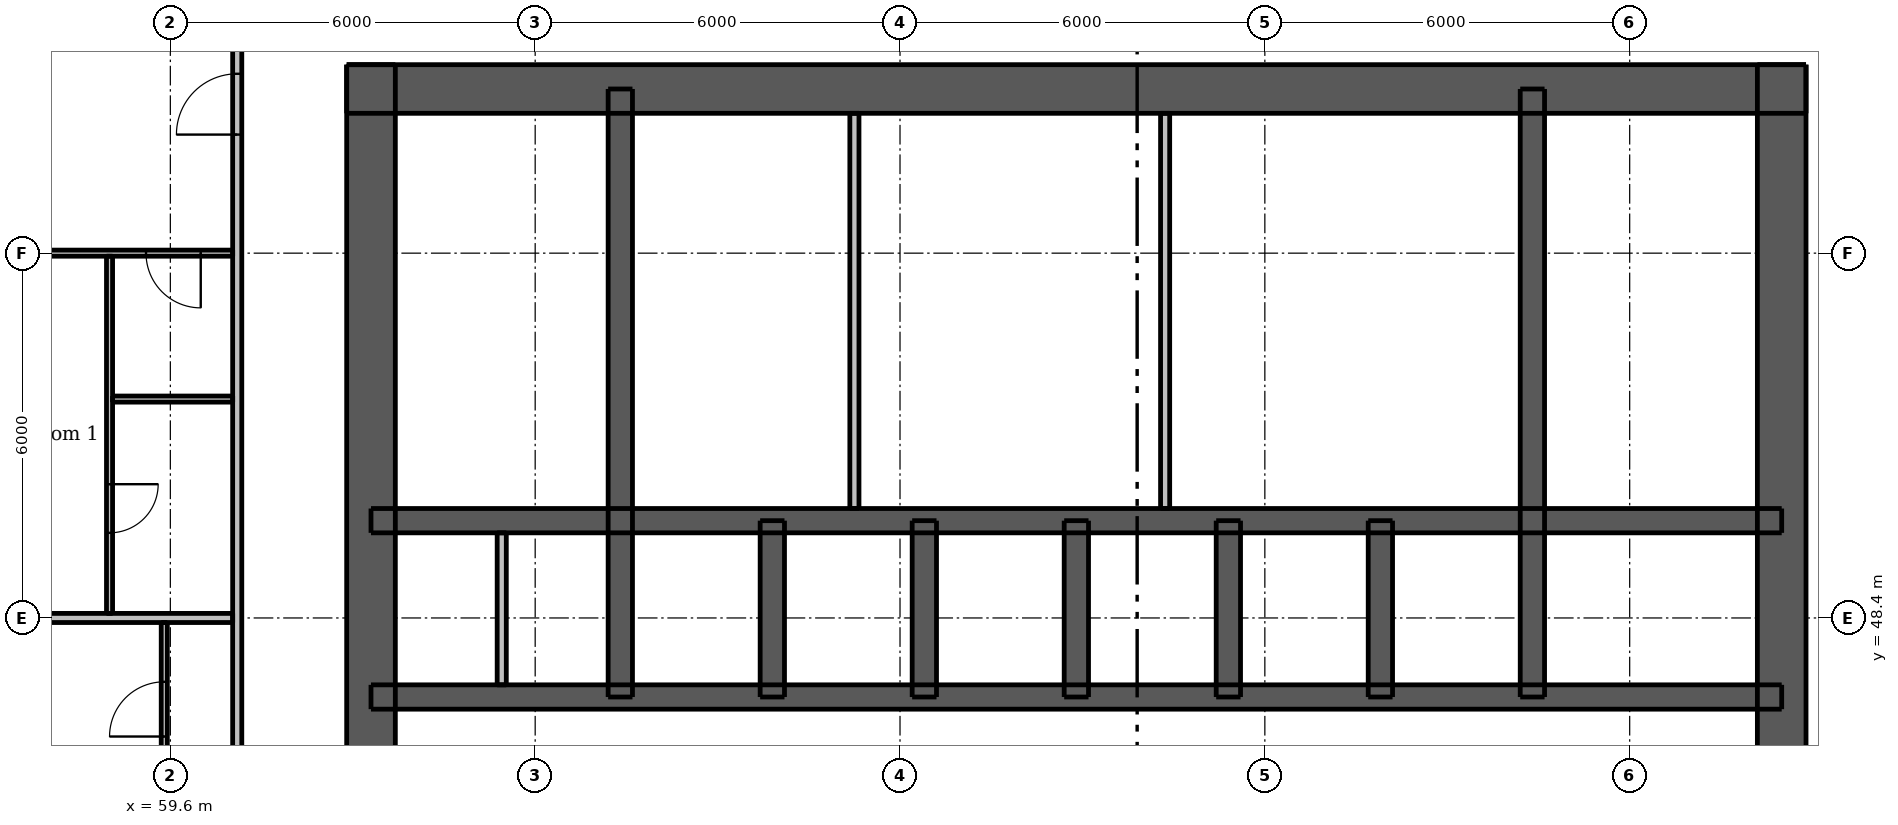
"""IFC4 building model, lengths in metres.
Left out: names, types, materials, properties, quantities, classifications, styles, units other than length and angle.
Written with IfcOpenShell. Run it as: python <this file> out.ifc"""

import sys

from ifc_helpers import new_model, si_unit, direction, frame, frame_2d, origin, place, context, subcontext, project, spatial, rectangle, extrude, element, fill, save


model = new_model("IFC4")
c1 = context("Model", 3, precision=1e-05, world=origin(), true_north=direction((0.0, 1.0)))
c2 = subcontext(c1, "Body", "Model", "MODEL_VIEW")
j1 = project(units=[si_unit("LENGTHUNIT", "METRE"), si_unit("PLANEANGLEUNIT", "RADIAN")], contexts=[c1])
p1 = place(None, origin())
s1 = spatial("IfcSite", under=j1, at=p1, CompositionType="ELEMENT")
p2 = place(p1, origin())
s2 = spatial("IfcBuilding", under=s1, at=p2, CompositionType="ELEMENT")
p3 = place(p2, frame((0.0, 0.0, 115.0)))
s3 = spatial("IfcBuildingStorey", under=s2, at=p3, CompositionType="ELEMENT", Elevation=115.0)
p4 = place(p3, frame((62.5, 57.1, 0.0), z_axis=(0.0, 0.0, 1.0), x_axis=(1.0, 0.0, 0.0)))
e1 = element("IfcWall", 1, at=p4, inside=s3, PredefinedType="SHEAR", context=c2, shape_type="SweptSolid", body=[
    extrude(rectangle(XDim=24.0, YDim=0.8, at=frame_2d((12.0, 0.0))), origin(), (0.0, 0.0, 1.0), 3.05),
])
p5 = place(p4, frame((20.9, 0.0, 0.0)))
e2 = element("IfcOpeningElement", 2, at=p5, cuts=e1, PredefinedType="OPENING", context=c2, shape_type="SweptSolid", body=[
    extrude(rectangle(XDim=1.1, YDim=2.1, at=frame_2d((0.55, 1.05))), frame((0.0, 0.41, 0.0), z_axis=(0.0, -1.0, 0.0), x_axis=(1.0, 0.0, 0.0)), (0.0, 0.0, 1.0), 0.82),
])
p6 = place(p4, frame((2.0, 0.0, 0.0)))
e3 = element("IfcOpeningElement", 3, at=p6, cuts=e1, PredefinedType="OPENING", context=c2, shape_type="SweptSolid", body=[
    extrude(rectangle(XDim=1.1, YDim=2.1, at=frame_2d((0.55, 1.05))), frame((0.0, 0.41, 0.0), z_axis=(0.0, -1.0, 0.0), x_axis=(1.0, 0.0, 0.0)), (0.0, 0.0, 1.0), 0.82),
])
p7 = place(p4, frame((6.075, 0.0, 0.0)))
e4 = element("IfcOpeningElement", 4, at=p7, cuts=e1, PredefinedType="OPENING", context=c2, shape_type="SweptSolid", body=[
    extrude(rectangle(XDim=0.9, YDim=2.1, at=frame_2d((0.45, 1.05))), frame((0.0, 0.41, 0.0), z_axis=(0.0, -1.0, 0.0), x_axis=(1.0, 0.0, 0.0)), (0.0, 0.0, 1.0), 0.82),
])
p8 = place(p4, frame((10.455, 0.0, 0.0)))
e5 = element("IfcOpeningElement", 5, at=p8, cuts=e1, PredefinedType="OPENING", context=c2, shape_type="SweptSolid", body=[
    extrude(rectangle(XDim=0.9, YDim=2.1, at=frame_2d((0.45, 1.05))), frame((0.0, 0.41, 0.0), z_axis=(0.0, -1.0, 0.0), x_axis=(1.0, 0.0, 0.0)), (0.0, 0.0, 1.0), 0.82),
])
p9 = place(p4, frame((15.93, 0.0, 0.0)))
e6 = element("IfcOpeningElement", 6, at=p9, cuts=e1, PredefinedType="OPENING", context=c2, shape_type="SweptSolid", body=[
    extrude(rectangle(XDim=0.9, YDim=2.1, at=frame_2d((0.45, 1.05))), frame((0.0, 0.41, 0.0), z_axis=(0.0, -1.0, 0.0), x_axis=(1.0, 0.0, 0.0)), (0.0, 0.0, 1.0), 0.82),
])
p10 = place(p3, frame((62.9, 33.5, 0.0), z_axis=(0.0, 0.0, 1.0), x_axis=(0.0, 1.0, 0.0)))
e7 = element("IfcWall", 7, at=p10, inside=s3, PredefinedType="SHEAR", context=c2, shape_type="SweptSolid", body=[
    extrude(rectangle(XDim=24.0, YDim=0.8, at=frame_2d((12.0, 0.0))), origin(), (0.0, 0.0, 1.0), 3.05),
])
p11 = place(p10, frame((11.2, 0.0, 0.0)))
e8 = element("IfcOpeningElement", 8, at=p11, cuts=e7, PredefinedType="OPENING", context=c2, shape_type="SweptSolid", body=[
    extrude(rectangle(XDim=1.6, YDim=2.1, at=frame_2d((0.8, 1.05))), frame((0.0, 0.41, 0.0), z_axis=(0.0, -1.0, 0.0), x_axis=(1.0, 0.0, 0.0)), (0.0, 0.0, 1.0), 0.82),
])
p12 = place(p3, frame((86.1, 33.5, 0.0), z_axis=(0.0, 0.0, 1.0), x_axis=(0.0, 1.0, 0.0)))
e9 = element("IfcWall", 9, at=p12, inside=s3, PredefinedType="SHEAR", context=c2, shape_type="SweptSolid", body=[
    extrude(rectangle(XDim=24.0, YDim=0.8, at=frame_2d((12.0, 0.0))), origin(), (0.0, 0.0, 1.0), 3.05),
])
p13 = place(p12, frame((11.2, 0.0, 0.0)))
e10 = element("IfcOpeningElement", 10, at=p13, cuts=e9, PredefinedType="OPENING", context=c2, shape_type="SweptSolid", body=[
    extrude(rectangle(XDim=1.6, YDim=2.1, at=frame_2d((0.8, 1.05))), frame((0.0, 0.41, 0.0), z_axis=(0.0, -1.0, 0.0), x_axis=(1.0, 0.0, 0.0)), (0.0, 0.0, 1.0), 0.82),
])
p14 = place(p3, frame((62.9, 47.1, 0.0), z_axis=(0.0, 0.0, 1.0), x_axis=(1.0, 0.0, 0.0)))
e11 = element("IfcWall", 11, at=p14, inside=s3, PredefinedType="SHEAR", context=c2, shape_type="SweptSolid", body=[
    extrude(rectangle(XDim=23.2, YDim=0.4, at=frame_2d((11.6, 0.0))), origin(), (0.0, 0.0, 1.0), 3.05),
])
p15 = place(p14, frame((0.825, 0.0, 0.0)))
e12 = element("IfcOpeningElement", 12, at=p15, cuts=e11, PredefinedType="OPENING", context=c2, shape_type="SweptSolid", body=[
    extrude(rectangle(XDim=0.9, YDim=2.1, at=frame_2d((0.45, 1.05))), frame((0.0, 0.21, 0.0), z_axis=(0.0, -1.0, 0.0), x_axis=(1.0, 0.0, 0.0)), (0.0, 0.0, 1.0), 0.42),
])
p16 = place(p14, frame((2.575, 0.0, 0.0)))
e13 = element("IfcOpeningElement", 13, at=p16, cuts=e11, PredefinedType="OPENING", context=c2, shape_type="SweptSolid", body=[
    extrude(rectangle(XDim=0.9, YDim=2.1, at=frame_2d((0.45, 1.05))), frame((0.0, 0.21, 0.0), z_axis=(0.0, -1.0, 0.0), x_axis=(1.0, 0.0, 0.0)), (0.0, 0.0, 1.0), 0.42),
])
p17 = place(p14, frame((20.6, 0.0, 0.0)))
e14 = element("IfcOpeningElement", 14, at=p17, cuts=e11, PredefinedType="OPENING", context=c2, shape_type="SweptSolid", body=[
    extrude(rectangle(XDim=0.9, YDim=2.1, at=frame_2d((0.45, 1.05))), frame((0.0, 0.21, 0.0), z_axis=(0.0, -1.0, 0.0), x_axis=(1.0, 0.0, 0.0)), (0.0, 0.0, 1.0), 0.42),
])
p18 = place(p3, frame((62.9, 50.0, 0.0), z_axis=(0.0, 0.0, 1.0), x_axis=(1.0, 0.0, 0.0)))
e15 = element("IfcWall", 15, at=p18, inside=s3, PredefinedType="SHEAR", context=c2, shape_type="SweptSolid", body=[
    extrude(rectangle(XDim=23.2, YDim=0.4, at=frame_2d((11.6, 0.0))), origin(), (0.0, 0.0, 1.0), 3.05),
])
for number, where, z_axis, x_axis in (
    (16, (67.0, 47.1, 0.0), (0.0, 0.0, 1.0), (0.0, 1.0, 0.0)),
    (17, (82.0, 47.1, 0.0), (0.0, 0.0, 1.0), (0.0, 1.0, 0.0)),
):
    element("IfcWall", number, at=place(p3, frame(where, z_axis=z_axis, x_axis=x_axis)), inside=s3, PredefinedType="SHEAR", context=c2, shape_type="SweptSolid", body=[
        extrude(rectangle(XDim=10.0, YDim=0.4, at=frame_2d((5.0, 0.0))), origin(), (0.0, 0.0, 1.0), 3.05),
    ])
for number, where, z_axis, x_axis in (
    (18, (69.5, 47.1, 0.0), (0.0, 0.0, 1.0), (0.0, 1.0, 0.0)),
    (19, (72.0, 47.1, 0.0), (0.0, 0.0, 1.0), (0.0, 1.0, 0.0)),
    (20, (74.5, 47.1, 0.0), (0.0, 0.0, 1.0), (0.0, 1.0, 0.0)),
    (21, (77.0, 47.1, 0.0), (0.0, 0.0, 1.0), (0.0, 1.0, 0.0)),
    (22, (79.5, 47.1, 0.0), (0.0, 0.0, 1.0), (0.0, 1.0, 0.0)),
):
    element("IfcWall", number, at=place(p3, frame(where, z_axis=z_axis, x_axis=x_axis)), inside=s3, PredefinedType="SHEAR", context=c2, shape_type="SweptSolid", body=[
        extrude(rectangle(XDim=2.9, YDim=0.4, at=frame_2d((1.45, 0.0))), origin(), (0.0, 0.0, 1.0), 3.05),
    ])
p19 = place(p3, frame((65.05, 47.3, 0.0), z_axis=(0.0, 0.0, 1.0), x_axis=(0.0, 1.0, 0.0)))
e23 = element("IfcWall", 23, at=p19, inside=s3, PredefinedType="PLUMBINGWALL", context=c2, shape_type="SweptSolid", body=[
    extrude(rectangle(XDim=2.5, YDim=0.15, at=frame_2d((1.25, 0.0))), origin(), (0.0, 0.0, 1.0), 3.05),
])
for number, where, z_axis, x_axis in (
    (24, (70.85, 50.2, 0.0), (0.0, 0.0, 1.0), (0.0, 1.0, 0.0)),
    (25, (75.96, 50.2, 0.0), (0.0, 0.0, 1.0), (0.0, 1.0, 0.0)),
):
    element("IfcWall", number, at=place(p3, frame(where, z_axis=z_axis, x_axis=x_axis)), inside=s3, PredefinedType="PLUMBINGWALL", context=c2, shape_type="SweptSolid", body=[
        extrude(rectangle(XDim=6.5, YDim=0.15, at=frame_2d((3.25, 0.0))), origin(), (0.0, 0.0, 1.0), 3.05),
    ])
p20 = place(p3, frame((58.6, 54.35, 0.0), z_axis=(0.0, 0.0, 1.0), x_axis=(0.0, -1.0, 0.0)))
e26 = element("IfcWall", 26, at=p20, inside=s3, PredefinedType="PARTITIONING", context=c2, shape_type="SweptSolid", body=[
    extrude(rectangle(XDim=5.875, YDim=0.1, at=frame_2d((2.938, 0.0))), origin(), (0.0, 0.0, 1.0), 3.05),
])
p21 = place(p20, frame((3.75, 0.0, 0.0)))
e27 = element("IfcOpeningElement", 27, at=p21, cuts=e26, PredefinedType="OPENING", context=c2, shape_type="SweptSolid", body=[
    extrude(rectangle(XDim=0.8, YDim=2.1, at=frame_2d((0.4, 1.05))), frame((0.0, 0.06, 0.0), z_axis=(0.0, -1.0, 0.0), x_axis=(1.0, 0.0, 0.0)), (0.0, 0.0, 1.0), 0.12),
])
p22 = place(p3, frame((59.5, 31.65, 0.0), z_axis=(0.0, 0.0, 1.0), x_axis=(0.0, 1.0, 0.0)))
e28 = element("IfcWall", 28, at=p22, inside=s3, PredefinedType="PARTITIONING", context=c2, shape_type="SweptSolid", body=[
    extrude(rectangle(XDim=16.675, YDim=0.1, at=frame_2d((8.337, 0.0))), origin(), (0.0, 0.0, 1.0), 2.51),
])
p23 = place(p22, frame((9.7, 0.0, 0.0)))
e29 = element("IfcOpeningElement", 29, at=p23, cuts=e28, PredefinedType="OPENING", context=c2, shape_type="SweptSolid", body=[
    extrude(rectangle(XDim=0.9, YDim=2.1, at=frame_2d((0.45, 1.05))), frame((0.0, 0.06, 0.0), z_axis=(0.0, -1.0, 0.0), x_axis=(1.0, 0.0, 0.0)), (0.0, 0.0, 1.0), 0.12),
])
p24 = place(p22, frame((14.8, 0.0, 0.0)))
e30 = element("IfcOpeningElement", 30, at=p24, cuts=e28, PredefinedType="OPENING", context=c2, shape_type="SweptSolid", body=[
    extrude(rectangle(XDim=0.9, YDim=2.1, at=frame_2d((0.45, 1.05))), frame((0.0, 0.06, 0.0), z_axis=(0.0, -1.0, 0.0), x_axis=(1.0, 0.0, 0.0)), (0.0, 0.0, 1.0), 0.12),
])
p25 = place(p22, frame((12.4, 0.0, 0.0)))
e31 = element("IfcOpeningElement", 31, at=p25, cuts=e28, PredefinedType="OPENING", context=c2, shape_type="SweptSolid", body=[
    extrude(rectangle(XDim=0.9, YDim=2.1, at=frame_2d((0.45, 1.05))), frame((0.0, 0.06, 0.0), z_axis=(0.0, -1.0, 0.0), x_axis=(1.0, 0.0, 0.0)), (0.0, 0.0, 1.0), 0.12),
])
p26 = place(p22, frame((5.2, 0.0, 0.0)))
e32 = element("IfcOpeningElement", 32, at=p26, cuts=e28, PredefinedType="OPENING", context=c2, shape_type="SweptSolid", body=[
    extrude(rectangle(XDim=0.9, YDim=2.1, at=frame_2d((0.45, 1.05))), frame((0.0, 0.06, 0.0), z_axis=(0.0, -1.0, 0.0), x_axis=(1.0, 0.0, 0.0)), (0.0, 0.0, 1.0), 0.12),
])
p27 = place(p22, frame((7.05, 0.0, 0.0)))
e33 = element("IfcOpeningElement", 33, at=p27, cuts=e28, PredefinedType="OPENING", context=c2, shape_type="SweptSolid", body=[
    extrude(rectangle(XDim=0.8, YDim=2.1, at=frame_2d((0.4, 1.05))), frame((0.0, 0.06, 0.0), z_axis=(0.0, -1.0, 0.0), x_axis=(1.0, 0.0, 0.0)), (0.0, 0.0, 1.0), 0.12),
])
p28 = place(p22, frame((0.75, 0.0, 0.0)))
e34 = element("IfcOpeningElement", 34, at=p28, cuts=e28, PredefinedType="OPENING", context=c2, shape_type="SweptSolid", body=[
    extrude(rectangle(XDim=0.9, YDim=2.1, at=frame_2d((0.45, 1.05))), frame((0.0, 0.06, 0.0), z_axis=(0.0, -1.0, 0.0), x_axis=(1.0, 0.0, 0.0)), (0.0, 0.0, 1.0), 0.12),
])
p29 = place(p22, frame((3.15, 0.0, 0.0)))
e35 = element("IfcOpeningElement", 35, at=p29, cuts=e28, PredefinedType="OPENING", context=c2, shape_type="SweptSolid", body=[
    extrude(rectangle(XDim=0.8, YDim=2.1, at=frame_2d((0.4, 1.05))), frame((0.0, 0.06, 0.0), z_axis=(0.0, -1.0, 0.0), x_axis=(1.0, 0.0, 0.0)), (0.0, 0.0, 1.0), 0.12),
])
p30 = place(p3, frame((60.625, 54.4, 0.0), z_axis=(0.0, 0.0, 1.0), x_axis=(-1.0, 0.0, 0.0)))
e36 = element("IfcWall", 36, at=p30, inside=s3, PredefinedType="PARTITIONING", context=c2, shape_type="SweptSolid", body=[
    extrude(rectangle(XDim=8.625, YDim=0.1, at=frame_2d((4.312, 0.0))), origin(), (0.0, 0.0, 1.0), 2.516),
])
p31 = place(p30, frame((0.525, 0.0, 0.0)))
e37 = element("IfcOpeningElement", 37, at=p31, cuts=e36, PredefinedType="OPENING", context=c2, shape_type="SweptSolid", body=[
    extrude(rectangle(XDim=0.9, YDim=2.1, at=frame_2d((0.45, 1.05))), frame((0.0, 0.06, 0.0), z_axis=(0.0, -1.0, 0.0), x_axis=(1.0, 0.0, 0.0)), (0.0, 0.0, 1.0), 0.12),
])
p32 = place(p30, frame((4.875, 0.0, 0.0)))
e38 = element("IfcOpeningElement", 38, at=p32, cuts=e36, PredefinedType="OPENING", context=c2, shape_type="SweptSolid", body=[
    extrude(rectangle(XDim=0.9, YDim=2.1, at=frame_2d((0.45, 1.05))), frame((0.0, 0.06, 0.0), z_axis=(0.0, -1.0, 0.0), x_axis=(1.0, 0.0, 0.0)), (0.0, 0.0, 1.0), 0.12),
])
p33 = place(p3, frame((58.65, 52.0, 0.0), z_axis=(0.0, 0.0, 1.0), x_axis=(1.0, 0.0, 0.0)))
e39 = element("IfcWall", 39, at=p33, inside=s3, PredefinedType="PARTITIONING", context=c2, shape_type="SweptSolid", body=[
    extrude(rectangle(XDim=1.975, YDim=0.1, at=frame_2d((0.988, 0.0))), origin(), (0.0, 0.0, 1.0), 3.05),
])
p34 = place(p3, frame((60.7, 30.325, 0.0), z_axis=(0.0, 0.0, 1.0), x_axis=(0.0, 1.0, 0.0)))
e40 = element("IfcWall", 40, at=p34, inside=s3, PredefinedType="PARTITIONING", context=c2, shape_type="SweptSolid", body=[
    extrude(rectangle(XDim=28.9, YDim=0.15, at=frame_2d((14.45, 0.0))), origin(), (0.0, 0.0, 1.0), 3.05),
])
p35 = place(p34, frame((9.225, 0.0, 0.0)))
e41 = element("IfcOpeningElement", 41, at=p35, cuts=e40, PredefinedType="OPENING", context=c2, shape_type="SweptSolid", body=[
    extrude(rectangle(XDim=1.0, YDim=2.1, at=frame_2d((0.5, 1.05))), frame((0.0, 0.085, 0.0), z_axis=(0.0, -1.0, 0.0), x_axis=(1.0, 0.0, 0.0)), (0.0, 0.0, 1.0), 0.17),
])
p36 = place(p34, frame((26.025, 0.0, 0.0)))
e42 = element("IfcOpeningElement", 42, at=p36, cuts=e40, PredefinedType="OPENING", context=c2, shape_type="SweptSolid", body=[
    extrude(rectangle(XDim=1.0, YDim=2.1, at=frame_2d((0.5, 1.05))), frame((0.0, 0.085, 0.0), z_axis=(0.0, -1.0, 0.0), x_axis=(1.0, 0.0, 0.0)), (0.0, 0.0, 1.0), 0.17),
])
p37 = place(p3, frame((52.0, 48.4, 0.0), z_axis=(0.0, 0.0, 1.0), x_axis=(1.0, 0.0, 0.0)))
e43 = element("IfcWall", 43, at=p37, inside=s3, PredefinedType="PARTITIONING", context=c2, shape_type="SweptSolid", body=[
    extrude(rectangle(XDim=8.625, YDim=0.15, at=frame_2d((4.312, 0.0))), origin(), (0.0, 0.0, 1.0), 2.516),
])
p38 = place(p5, origin())
e44 = element("IfcDoor", 44, at=p38, inside=s3, OperationType="SINGLE_SWING_RIGHT", PredefinedType="DOOR", context=c2, shape_type="SweptSolid", body=[
    extrude(rectangle(XDim=1.1, YDim=2.1, at=frame_2d((0.55, 1.05))), frame((0.0, -0.337, 0.0), z_axis=(0.0, -1.0, 0.0), x_axis=(1.0, 0.0, 0.0)), (0.0, 0.0, 1.0), 0.05),
])
fill(e2, e44)
p39 = place(p6, origin())
e45 = element("IfcDoor", 45, at=p39, inside=s3, OperationType="SINGLE_SWING_LEFT", PredefinedType="DOOR", context=c2, shape_type="SweptSolid", body=[
    extrude(rectangle(XDim=1.1, YDim=2.1, at=frame_2d((0.55, 1.05))), frame((0.0, -0.337, 0.0), z_axis=(0.0, -1.0, 0.0), x_axis=(1.0, 0.0, 0.0)), (0.0, 0.0, 1.0), 0.05),
])
fill(e3, e45)
p40 = place(p15, origin())
e46 = element("IfcDoor", 46, at=p40, inside=s3, OperationType="SINGLE_SWING_LEFT", PredefinedType="DOOR", context=c2, shape_type="SweptSolid", body=[
    extrude(rectangle(XDim=0.9, YDim=2.1, at=frame_2d((0.45, 1.05))), frame((0.0, 0.188, 0.0), z_axis=(0.0, -1.0, 0.0), x_axis=(1.0, 0.0, 0.0)), (0.0, 0.0, 1.0), 0.05),
])
fill(e12, e46)
p41 = place(p16, origin())
e47 = element("IfcDoor", 47, at=p41, inside=s3, OperationType="SINGLE_SWING_RIGHT", PredefinedType="DOOR", context=c2, shape_type="SweptSolid", body=[
    extrude(rectangle(XDim=0.9, YDim=2.1, at=frame_2d((0.45, 1.05))), frame((0.0, 0.188, 0.0), z_axis=(0.0, -1.0, 0.0), x_axis=(1.0, 0.0, 0.0)), (0.0, 0.0, 1.0), 0.05),
])
fill(e13, e47)
p42 = place(p17, origin())
e48 = element("IfcDoor", 48, at=p42, inside=s3, OperationType="SINGLE_SWING_LEFT", PredefinedType="DOOR", context=c2, shape_type="SweptSolid", body=[
    extrude(rectangle(XDim=0.9, YDim=2.1, at=frame_2d((0.45, 1.05))), frame((0.0, 0.188, 0.0), z_axis=(0.0, -1.0, 0.0), x_axis=(1.0, 0.0, 0.0)), (0.0, 0.0, 1.0), 0.05),
])
fill(e14, e48)
p43 = place(p7, origin())
e49 = element("IfcDoor", 49, at=p43, inside=s3, OperationType="SINGLE_SWING_RIGHT", PredefinedType="DOOR", context=c2, shape_type="SweptSolid", body=[
    extrude(rectangle(XDim=0.9, YDim=2.1, at=frame_2d((0.45, 1.05))), frame((0.0, -0.337, 0.0), z_axis=(0.0, -1.0, 0.0), x_axis=(1.0, 0.0, 0.0)), (0.0, 0.0, 1.0), 0.05),
])
fill(e4, e49)
p44 = place(p8, origin())
e50 = element("IfcDoor", 50, at=p44, inside=s3, OperationType="SINGLE_SWING_RIGHT", PredefinedType="DOOR", context=c2, shape_type="SweptSolid", body=[
    extrude(rectangle(XDim=0.9, YDim=2.1, at=frame_2d((0.45, 1.05))), frame((0.0, -0.337, 0.0), z_axis=(0.0, -1.0, 0.0), x_axis=(1.0, 0.0, 0.0)), (0.0, 0.0, 1.0), 0.05),
])
fill(e5, e50)
p45 = place(p9, origin())
e51 = element("IfcDoor", 51, at=p45, inside=s3, OperationType="SINGLE_SWING_RIGHT", PredefinedType="DOOR", context=c2, shape_type="SweptSolid", body=[
    extrude(rectangle(XDim=0.9, YDim=2.1, at=frame_2d((0.45, 1.05))), frame((0.0, -0.337, 0.0), z_axis=(0.0, -1.0, 0.0), x_axis=(1.0, 0.0, 0.0)), (0.0, 0.0, 1.0), 0.05),
])
fill(e6, e51)
p46 = place(p24, origin())
e52 = element("IfcDoor", 52, at=p46, inside=s3, OperationType="SINGLE_SWING_LEFT", PredefinedType="DOOR", context=c2, shape_type="SweptSolid", body=[
    extrude(rectangle(XDim=0.9, YDim=2.1, at=frame_2d((0.45, 1.05))), frame((0.0, 0.025, 0.0), z_axis=(0.0, -1.0, 0.0), x_axis=(1.0, 0.0, 0.0)), (0.0, 0.0, 1.0), 0.05),
])
fill(e30, e52)
p47 = place(p36, origin())
e53 = element("IfcDoor", 53, at=p47, inside=s3, OperationType="SINGLE_SWING_LEFT", PredefinedType="DOOR", context=c2, shape_type="SweptSolid", body=[
    extrude(rectangle(XDim=1.0, YDim=2.1, at=frame_2d((0.5, 1.05))), frame((0.0, 0.025, 0.0), z_axis=(0.0, -1.0, 0.0), x_axis=(1.0, 0.0, 0.0)), (0.0, 0.0, 1.0), 0.05),
])
fill(e42, e53)
p48 = place(p31, origin())
e54 = element("IfcDoor", 54, at=p48, inside=s3, OperationType="SINGLE_SWING_LEFT", PredefinedType="DOOR", context=c2, shape_type="SweptSolid", body=[
    extrude(rectangle(XDim=0.9, YDim=2.1, at=frame_2d((0.45, 1.05))), frame((0.0, 0.025, 0.0), z_axis=(0.0, -1.0, 0.0), x_axis=(1.0, 0.0, 0.0)), (0.0, 0.0, 1.0), 0.05),
])
fill(e37, e54)
p49 = place(p21, origin())
e55 = element("IfcDoor", 55, at=p49, inside=s3, OperationType="SINGLE_SWING_LEFT", PredefinedType="DOOR", context=c2, shape_type="SweptSolid", body=[
    extrude(rectangle(XDim=0.8, YDim=2.1, at=frame_2d((0.4, 1.05))), frame((0.0, 0.025, 0.0), z_axis=(0.0, -1.0, 0.0), x_axis=(1.0, 0.0, 0.0)), (0.0, 0.0, 1.0), 0.05),
])
fill(e27, e55)
save(model, sys.argv[1])
